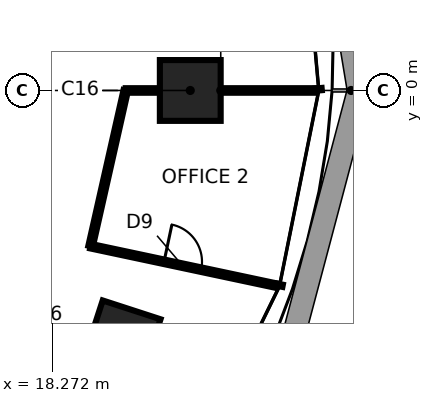
"""IFC4 building model, lengths in metres.
Left out: names, types, materials, properties, quantities, classifications, styles, units other than length and angle.
Written with IfcOpenShell. Run it as: python <this file> out.ifc"""

import sys

from ifc_helpers import new_model, si_unit, direction, frame, frame_2d, origin, origin_2d, place, context, subcontext, project, spatial, rectangle, extrude, element, fill, save


model = new_model("IFC4")
c1 = context("Model", 3, precision=1e-05, world=origin(), true_north=direction((0.0, 1.0)))
c2 = subcontext(c1, "Body", "Model", "MODEL_VIEW")
j1 = project(units=[si_unit("LENGTHUNIT", "METRE"), si_unit("PLANEANGLEUNIT", "RADIAN")], contexts=[c1])
p1 = place(None, origin())
s1 = spatial("IfcSite", under=j1, at=p1, CompositionType="ELEMENT")
p2 = place(p1, origin())
s2 = spatial("IfcBuilding", under=s1, at=p2, CompositionType="ELEMENT")
p3 = place(p2, frame((0.0, 0.0, 147.0)))
s3 = spatial("IfcBuildingStorey", under=s2, at=p3, CompositionType="ELEMENT", Elevation=147.0)
for number, where, z_axis, x_axis in (
    (1, (21.9, 0.0, 0.0), (0.0, 0.0, 1.0), (1.0, 0.0, 0.0)),
    (2, (20.109, -6.534, 0.0), (0.0, 0.0, 1.0), (0.951, -0.309, 0.0)),
):
    element("IfcColumn", number, at=place(p3, frame(where, z_axis=z_axis, x_axis=x_axis)), inside=s3, PredefinedType="COLUMN", context=c2, shape_type="SweptSolid", body=[
        extrude(rectangle(XDim=1.6, YDim=1.6, at=origin_2d()), origin(), (0.0, 0.0, 1.0), 3.9),
    ])
p4 = place(p3, frame((19.277, -4.097, 0.0), z_axis=(0.0, 0.0, 1.0), x_axis=(0.978149046495, -0.207904888932, 0.0)))
e3 = element("IfcWall", 3, at=p4, inside=s3, PredefinedType="PARTITIONING", context=c2, shape_type="SweptSolid", body=[
    extrude(rectangle(XDim=5.0, YDim=0.12, at=frame_2d((2.5, 0.0))), origin(), (0.0, 0.0, 1.0), 3.74),
])
p5 = place(p4, frame((1.975, 0.0, 0.0)))
e4 = element("IfcOpeningElement", 4, at=p5, cuts=e3, PredefinedType="OPENING", context=c2, shape_type="SweptSolid", body=[
    extrude(rectangle(XDim=1.0, YDim=2.4, at=frame_2d((0.5, 1.2))), frame((0.0, 0.07, 0.0), z_axis=(0.0, -1.0, 0.0), x_axis=(1.0, 0.0, 0.0)), (0.0, 0.0, 1.0), 0.14),
])
p6 = place(p3, frame((20.202, 0.0, 0.0), z_axis=(0.0, 0.0, 1.0), x_axis=(-0.220166321364, -0.975462347268, 0.0)))
e5 = element("IfcWall", 5, at=p6, inside=s3, PredefinedType="PARTITIONING", context=c2, shape_type="SweptSolid", body=[
    extrude(rectangle(XDim=4.2, YDim=0.12, at=frame_2d((2.1, 0.0))), origin(), (0.0, 0.0, 1.0), 3.74),
])
p7 = place(p3, frame((25.202, 0.0, 0.0), z_axis=(0.0, 0.0, 1.0), x_axis=(-1.0, 0.0, 0.0)))
e6 = element("IfcWall", 6, at=p7, inside=s3, PredefinedType="PARTITIONING", context=c2, shape_type="SweptSolid", body=[
    extrude(rectangle(XDim=5.0, YDim=0.12, at=frame_2d((2.5, 0.0))), origin(), (0.0, 0.0, 1.0), 2.94),
])
p8 = place(p5, origin())
e7 = element("IfcDoor", 7, at=p8, inside=s3, OperationType="SINGLE_SWING_LEFT", PredefinedType="DOOR", context=c2, shape_type="SweptSolid", body=[
    extrude(rectangle(XDim=1.0, YDim=2.4, at=frame_2d((0.5, 1.2))), frame((0.0, 0.025, 0.0), z_axis=(0.0, -1.0, 0.0), x_axis=(1.0, 0.0, 0.0)), (0.0, 0.0, 1.0), 0.05),
])
fill(e4, e7)
save(model, sys.argv[1])
